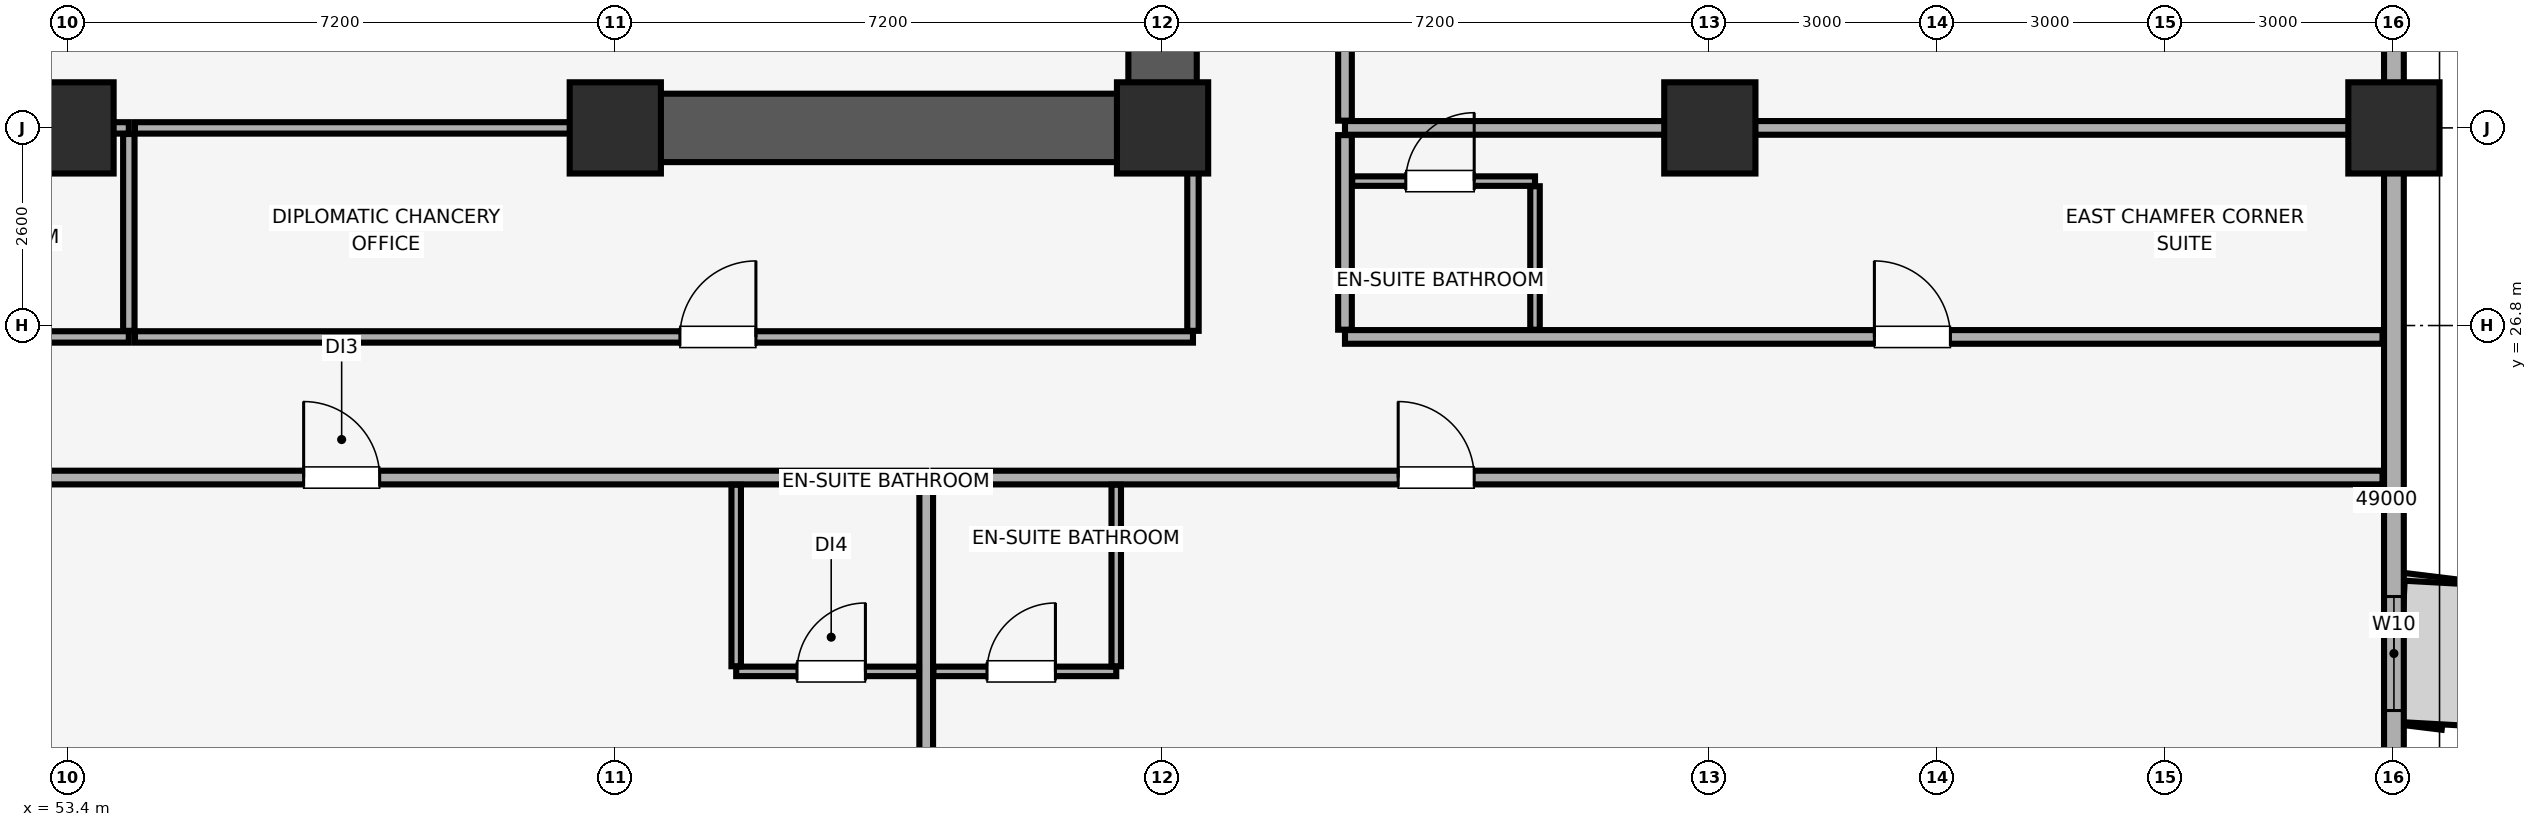
"""IFC4 building model, lengths in metres.
Left out: names, types, materials, properties, quantities, classifications, styles, units other than length and angle.
Written with IfcOpenShell. Run it as: python <this file> out.ifc"""

import sys

from ifc_helpers import new_model, si_unit, direction, frame, frame_2d, origin, origin_2d, place, context, subcontext, project, spatial, rectangle, extrude, element, fill, save


model = new_model("IFC4")
c1 = context("Model", 3, precision=1e-05, world=origin(), true_north=direction((0.0, 1.0)))
c2 = subcontext(c1, "Body", "Model", "MODEL_VIEW")
j1 = project(units=[si_unit("LENGTHUNIT", "METRE"), si_unit("PLANEANGLEUNIT", "RADIAN")], contexts=[c1])
p1 = place(None, origin())
s1 = spatial("IfcSite", under=j1, at=p1, CompositionType="ELEMENT")
p2 = place(p1, origin())
s2 = spatial("IfcBuilding", under=s1, at=p2, CompositionType="ELEMENT")
p3 = place(p2, frame((0.0, 0.0, 126.8)))
s3 = spatial("IfcBuildingStorey", under=s2, at=p3, CompositionType="ELEMENT", Elevation=126.8)
for number, where, z_axis, x_axis in (
    (1, (84.0, 29.4, 0.0), (0.0, 0.0, 1.0), (1.0, 0.0, 0.0)),
    (2, (53.4, 29.4, 0.0), (0.0, 0.0, 1.0), (1.0, 0.0, 0.0)),
    (3, (60.6, 29.4, 0.0), (0.0, 0.0, 1.0), (1.0, 0.0, 0.0)),
    (4, (67.8, 29.4, 0.0), (0.0, 0.0, 1.0), (1.0, 0.0, 0.0)),
    (5, (75.0, 29.4, 0.0), (0.0, 0.0, 1.0), (1.0, 0.0, 0.0)),
):
    element("IfcColumn", number, at=place(p3, frame(where, z_axis=z_axis, x_axis=x_axis)), inside=s3, PredefinedType="COLUMN", context=c2, shape_type="SweptSolid", body=[
        extrude(rectangle(XDim=1.2, YDim=1.2, at=origin_2d()), origin(), (0.0, 0.0, 1.0), 3.51),
    ])
p4 = place(p3, frame((84.0, 4.2, 0.0), z_axis=(0.0, 0.0, 1.0), x_axis=(0.0, 1.0, 0.0)))
e6 = element("IfcWall", 6, at=p4, inside=s3, PredefinedType="SOLIDWALL", context=c2, shape_type="SweptSolid", body=[
    extrude(rectangle(XDim=40.6, YDim=0.26, at=frame_2d((20.3, 0.0))), origin(), (0.0, 0.0, 1.0), 2.56),
])
p5 = place(p4, frame((6.05, 0.0, 0.85)))
e7 = element("IfcOpeningElement", 7, at=p5, cuts=e6, PredefinedType="OPENING", context=c2, shape_type="SweptSolid", body=[
    extrude(rectangle(XDim=1.5, YDim=1.4, at=frame_2d((0.75, 0.7))), frame((0.0, 0.14, 0.0), z_axis=(0.0, -1.0, 0.0), x_axis=(1.0, 0.0, 0.0)), (0.0, 0.0, 1.0), 0.28),
])
p6 = place(p4, frame((12.765, 0.0, 0.85)))
e8 = element("IfcOpeningElement", 8, at=p6, cuts=e6, PredefinedType="OPENING", context=c2, shape_type="SweptSolid", body=[
    extrude(rectangle(XDim=1.5, YDim=1.4, at=frame_2d((0.75, 0.7))), frame((0.0, 0.14, 0.0), z_axis=(0.0, -1.0, 0.0), x_axis=(1.0, 0.0, 0.0)), (0.0, 0.0, 1.0), 0.28),
])
p7 = place(p4, frame((17.535, 0.0, 0.85)))
e9 = element("IfcOpeningElement", 9, at=p7, cuts=e6, PredefinedType="OPENING", context=c2, shape_type="SweptSolid", body=[
    extrude(rectangle(XDim=1.5, YDim=1.4, at=frame_2d((0.75, 0.7))), frame((0.0, 0.14, 0.0), z_axis=(0.0, -1.0, 0.0), x_axis=(1.0, 0.0, 0.0)), (0.0, 0.0, 1.0), 0.28),
])
p8 = place(p4, frame((27.165, 0.0, 0.85)))
e10 = element("IfcOpeningElement", 10, at=p8, cuts=e6, PredefinedType="OPENING", context=c2, shape_type="SweptSolid", body=[
    extrude(rectangle(XDim=1.5, YDim=1.4, at=frame_2d((0.75, 0.7))), frame((0.0, 0.14, 0.0), z_axis=(0.0, -1.0, 0.0), x_axis=(1.0, 0.0, 0.0)), (0.0, 0.0, 1.0), 0.28),
])
p9 = place(p4, frame((31.935, 0.0, 0.85)))
e11 = element("IfcOpeningElement", 11, at=p9, cuts=e6, PredefinedType="OPENING", context=c2, shape_type="SweptSolid", body=[
    extrude(rectangle(XDim=1.5, YDim=1.4, at=frame_2d((0.75, 0.7))), frame((0.0, 0.14, 0.0), z_axis=(0.0, -1.0, 0.0), x_axis=(1.0, 0.0, 0.0)), (0.0, 0.0, 1.0), 0.28),
])
p10 = place(p4, frame((37.365, 0.0, 0.85)))
e12 = element("IfcOpeningElement", 12, at=p10, cuts=e6, PredefinedType="OPENING", context=c2, shape_type="SweptSolid", body=[
    extrude(rectangle(XDim=1.5, YDim=1.4, at=frame_2d((0.75, 0.7))), frame((0.0, 0.14, 0.0), z_axis=(0.0, -1.0, 0.0), x_axis=(1.0, 0.0, 0.0)), (0.0, 0.0, 1.0), 0.28),
])
p11 = place(p3, frame((67.8, 29.4, 0.0), z_axis=(0.0, 0.0, 1.0), x_axis=(0.0, 1.0, 0.0)))
e13 = element("IfcWall", 13, at=p11, inside=s3, PredefinedType="SHEAR", context=c2, shape_type="SweptSolid", body=[
    extrude(rectangle(XDim=19.2, YDim=0.9, at=frame_2d((9.6, 0.0))), origin(), (0.0, 0.0, 1.0), 3.51),
])
p12 = place(p3, frame((46.0, 29.4, 0.0), z_axis=(0.0, 0.0, 1.0), x_axis=(1.0, 0.0, 0.0)))
e14 = element("IfcWall", 14, at=p12, inside=s3, PredefinedType="SHEAR", context=c2, shape_type="SweptSolid", body=[
    extrude(rectangle(XDim=7.6, YDim=0.9, at=frame_2d((3.8, 0.0))), origin(), (0.0, 0.0, 1.0), 3.51),
])
p13 = place(p3, frame((60.4, 29.4, 0.0), z_axis=(0.0, 0.0, 1.0), x_axis=(1.0, 0.0, 0.0)))
e15 = element("IfcWall", 15, at=p13, inside=s3, PredefinedType="SHEAR", context=c2, shape_type="SweptSolid", body=[
    extrude(rectangle(XDim=6.945, YDim=0.9, at=frame_2d((3.473, 0.0))), origin(), (0.0, 0.0, 1.0), 3.51),
])
p14 = place(p3, frame((49.625, 24.8, 0.0), z_axis=(0.0, 0.0, 1.0), x_axis=(1.0, 0.0, 0.0)))
e16 = element("IfcWall", 16, at=p14, inside=s3, PredefinedType="PARTITIONING", context=c2, shape_type="SweptSolid", body=[
    extrude(rectangle(XDim=15.066, YDim=0.18, at=frame_2d((7.533, 0.0))), origin(), (0.0, 0.0, 1.0), 3.51),
])
p15 = place(p14, frame((6.875, 0.0, 0.0)))
e17 = element("IfcOpeningElement", 17, at=p15, cuts=e16, PredefinedType="OPENING", context=c2, shape_type="SweptSolid", body=[
    extrude(rectangle(XDim=1.0, YDim=2.15, at=frame_2d((0.5, 1.075))), frame((0.0, 0.1, 0.0), z_axis=(0.0, -1.0, 0.0), x_axis=(1.0, 0.0, 0.0)), (0.0, 0.0, 1.0), 0.2),
])
p16 = place(p3, frame((64.691, 0.15, 0.0), z_axis=(0.0, 0.0, 1.0), x_axis=(0.0, 1.0, 0.0)))
e18 = element("IfcWall", 18, at=p16, inside=s3, PredefinedType="PARTITIONING", context=c2, shape_type="SweptSolid", body=[
    extrude(rectangle(XDim=24.555, YDim=0.18, at=frame_2d((12.278, 0.0))), origin(), (0.0, 0.0, 1.0), 3.51),
])
p17 = place(p3, frame((62.191, 22.25, 0.0), z_axis=(0.0, 0.0, 1.0), x_axis=(1.0, 0.0, 0.0)))
e19 = element("IfcWall", 19, at=p17, inside=s3, PredefinedType="PARTITIONING", context=c2, shape_type="SweptSolid", body=[
    extrude(rectangle(XDim=2.405, YDim=0.125, at=frame_2d((1.203, 0.0))), origin(), (0.0, 0.0, 1.0), 3.51),
])
p18 = place(p17, frame((0.8, 0.0, 0.0)))
e20 = element("IfcOpeningElement", 20, at=p18, cuts=e19, PredefinedType="OPENING", context=c2, shape_type="SweptSolid", body=[
    extrude(rectangle(XDim=0.9, YDim=2.1, at=frame_2d((0.45, 1.05))), frame((0.0, 0.073, 0.0), z_axis=(0.0, -1.0, 0.0), x_axis=(1.0, 0.0, 0.0)), (0.0, 0.0, 1.0), 0.145),
])
p19 = place(p3, frame((62.191, 22.317, 0.0), z_axis=(0.0, 0.0, 1.0), x_axis=(0.0, 1.0, 0.0)))
e21 = element("IfcWall", 21, at=p19, inside=s3, PredefinedType="PARTITIONING", context=c2, shape_type="SweptSolid", body=[
    extrude(rectangle(XDim=2.388, YDim=0.125, at=frame_2d((1.194, 0.0))), origin(), (0.0, 0.0, 1.0), 3.51),
])
p20 = place(p3, frame((64.786, 24.8, 0.0), z_axis=(0.0, 0.0, 1.0), x_axis=(1.0, 0.0, 0.0)))
e22 = element("IfcWall", 22, at=p20, inside=s3, PredefinedType="PARTITIONING", context=c2, shape_type="SweptSolid", body=[
    extrude(rectangle(XDim=19.064, YDim=0.18, at=frame_2d((9.532, 0.0))), origin(), (0.0, 0.0, 1.0), 3.51),
])
p21 = place(p20, frame((6.115, 0.0, 0.0)))
e23 = element("IfcOpeningElement", 23, at=p21, cuts=e22, PredefinedType="OPENING", context=c2, shape_type="SweptSolid", body=[
    extrude(rectangle(XDim=1.0, YDim=2.15, at=frame_2d((0.5, 1.075))), frame((0.0, 0.1, 0.0), z_axis=(0.0, -1.0, 0.0), x_axis=(1.0, 0.0, 0.0)), (0.0, 0.0, 1.0), 0.2),
])
p22 = place(p3, frame((64.786, 22.25, 0.0), z_axis=(0.0, 0.0, 1.0), x_axis=(1.0, 0.0, 0.0)))
e24 = element("IfcWall", 24, at=p22, inside=s3, PredefinedType="PARTITIONING", context=c2, shape_type="SweptSolid", body=[
    extrude(rectangle(XDim=2.405, YDim=0.125, at=frame_2d((1.203, 0.0))), origin(), (0.0, 0.0, 1.0), 3.51),
])
p23 = place(p22, frame((0.705, 0.0, 0.0)))
e25 = element("IfcOpeningElement", 25, at=p23, cuts=e24, PredefinedType="OPENING", context=c2, shape_type="SweptSolid", body=[
    extrude(rectangle(XDim=0.9, YDim=2.1, at=frame_2d((0.45, 1.05))), frame((0.0, 0.073, 0.0), z_axis=(0.0, -1.0, 0.0), x_axis=(1.0, 0.0, 0.0)), (0.0, 0.0, 1.0), 0.145),
])
p24 = place(p3, frame((67.191, 22.317, 0.0), z_axis=(0.0, 0.0, 1.0), x_axis=(0.0, 1.0, 0.0)))
e26 = element("IfcWall", 26, at=p24, inside=s3, PredefinedType="PARTITIONING", context=c2, shape_type="SweptSolid", body=[
    extrude(rectangle(XDim=2.388, YDim=0.125, at=frame_2d((1.194, 0.0))), origin(), (0.0, 0.0, 1.0), 3.51),
])
p25 = place(p3, frame((44.2, 26.65, 0.0), z_axis=(0.0, 0.0, 1.0), x_axis=(1.0, 0.0, 0.0)))
e27 = element("IfcWall", 27, at=p25, inside=s3, PredefinedType="PARTITIONING", context=c2, shape_type="SweptSolid", body=[
    extrude(rectangle(XDim=10.0, YDim=0.15, at=frame_2d((5.0, 0.0))), origin(), (0.0, 0.0, 1.0), 3.51),
])
p26 = place(p25, frame((4.5, 0.0, 0.0)))
e28 = element("IfcOpeningElement", 28, at=p26, cuts=e27, PredefinedType="OPENING", context=c2, shape_type="SweptSolid", body=[
    extrude(rectangle(XDim=1.0, YDim=2.15, at=frame_2d((0.5, 1.075))), frame((0.0, 0.085, 0.0), z_axis=(0.0, -1.0, 0.0), x_axis=(1.0, 0.0, 0.0)), (0.0, 0.0, 1.0), 0.17),
])
p27 = place(p3, frame((53.61, 29.4, 0.0), z_axis=(0.0, 0.0, 1.0), x_axis=(1.0, 0.0, 0.0)))
e29 = element("IfcWall", 29, at=p27, inside=s3, PredefinedType="PARTITIONING", context=c2, shape_type="SweptSolid", body=[
    extrude(rectangle(XDim=0.59, YDim=0.15, at=frame_2d((0.295, 0.0))), origin(), (0.0, 0.0, 1.0), 2.41),
])
p28 = place(p3, frame((54.2, 26.73, 0.0), z_axis=(0.0, 0.0, 1.0), x_axis=(0.0, 1.0, 0.0)))
e30 = element("IfcWall", 30, at=p28, inside=s3, PredefinedType="PARTITIONING", context=c2, shape_type="SweptSolid", body=[
    extrude(rectangle(XDim=2.59, YDim=0.15, at=frame_2d((1.295, 0.0))), origin(), (0.0, 0.0, 1.0), 3.51),
])
p29 = place(p3, frame((54.28, 26.65, 0.0), z_axis=(0.0, 0.0, 1.0), x_axis=(1.0, 0.0, 0.0)))
e31 = element("IfcWall", 31, at=p29, inside=s3, PredefinedType="PARTITIONING", context=c2, shape_type="SweptSolid", body=[
    extrude(rectangle(XDim=13.92, YDim=0.15, at=frame_2d((6.96, 0.0))), origin(), (0.0, 0.0, 1.0), 3.51),
])
p30 = place(p29, frame((7.17, 0.0, 0.0)))
e32 = element("IfcOpeningElement", 32, at=p30, cuts=e31, PredefinedType="OPENING", context=c2, shape_type="SweptSolid", body=[
    extrude(rectangle(XDim=1.0, YDim=2.15, at=frame_2d((0.5, 1.075))), frame((0.0, 0.085, 0.0), z_axis=(0.0, -1.0, 0.0), x_axis=(1.0, 0.0, 0.0)), (0.0, 0.0, 1.0), 0.17),
])
p31 = place(p3, frame((54.28, 29.4, 0.0), z_axis=(0.0, 0.0, 1.0), x_axis=(1.0, 0.0, 0.0)))
e33 = element("IfcWall", 33, at=p31, inside=s3, PredefinedType="PARTITIONING", context=c2, shape_type="SweptSolid", body=[
    extrude(rectangle(XDim=6.11, YDim=0.15, at=frame_2d((3.055, 0.0))), origin(), (0.0, 0.0, 1.0), 2.41),
])
p32 = place(p3, frame((68.2, 26.73, 0.0), z_axis=(0.0, 0.0, 1.0), x_axis=(0.0, 1.0, 0.0)))
e34 = element("IfcWall", 34, at=p32, inside=s3, PredefinedType="PARTITIONING", context=c2, shape_type="SweptSolid", body=[
    extrude(rectangle(XDim=2.66, YDim=0.15, at=frame_2d((1.33, 0.0))), origin(), (0.0, 0.0, 1.0), 3.51),
])
p33 = place(p3, frame((70.2, 26.65, 0.0), z_axis=(0.0, 0.0, 1.0), x_axis=(1.0, 0.0, 0.0)))
e35 = element("IfcWall", 35, at=p33, inside=s3, PredefinedType="PARTITIONING", context=c2, shape_type="SweptSolid", body=[
    extrude(rectangle(XDim=13.65, YDim=0.18, at=frame_2d((6.825, 0.0))), origin(), (0.0, 0.0, 1.0), 3.51),
])
p34 = place(p33, frame((6.965, 0.0, 0.0)))
e36 = element("IfcOpeningElement", 36, at=p34, cuts=e35, PredefinedType="OPENING", context=c2, shape_type="SweptSolid", body=[
    extrude(rectangle(XDim=1.0, YDim=2.15, at=frame_2d((0.5, 1.075))), frame((0.0, 0.1, 0.0), z_axis=(0.0, -1.0, 0.0), x_axis=(1.0, 0.0, 0.0)), (0.0, 0.0, 1.0), 0.2),
])
p35 = place(p3, frame((70.2, 29.4, 0.0), z_axis=(0.0, 0.0, 1.0), x_axis=(1.0, 0.0, 0.0)))
e37 = element("IfcWall", 37, at=p35, inside=s3, PredefinedType="PARTITIONING", context=c2, shape_type="SweptSolid", body=[
    extrude(rectangle(XDim=13.65, YDim=0.18, at=frame_2d((6.825, 0.0))), origin(), (0.0, 0.0, 1.0), 2.669),
])
p36 = place(p3, frame((70.2, 26.745, 0.0), z_axis=(0.0, 0.0, 1.0), x_axis=(0.0, 1.0, 0.0)))
e38 = element("IfcWall", 38, at=p36, inside=s3, PredefinedType="PARTITIONING", context=c2, shape_type="SweptSolid", body=[
    extrude(rectangle(XDim=2.56, YDim=0.18, at=frame_2d((1.28, 0.0))), origin(), (0.0, 0.0, 1.0), 3.51),
])
p37 = place(p3, frame((70.295, 28.7, 0.0), z_axis=(0.0, 0.0, 1.0), x_axis=(1.0, 0.0, 0.0)))
e39 = element("IfcWall", 39, at=p37, inside=s3, PredefinedType="PARTITIONING", context=c2, shape_type="SweptSolid", body=[
    extrude(rectangle(XDim=2.405, YDim=0.125, at=frame_2d((1.203, 0.0))), origin(), (0.0, 0.0, 1.0), 3.51),
])
p38 = place(p37, frame((0.705, 0.0, 0.0)))
e40 = element("IfcOpeningElement", 40, at=p38, cuts=e39, PredefinedType="OPENING", context=c2, shape_type="SweptSolid", body=[
    extrude(rectangle(XDim=0.9, YDim=2.1, at=frame_2d((0.45, 1.05))), frame((0.0, 0.073, 0.0), z_axis=(0.0, -1.0, 0.0), x_axis=(1.0, 0.0, 0.0)), (0.0, 0.0, 1.0), 0.145),
])
p39 = place(p3, frame((72.7, 26.745, 0.0), z_axis=(0.0, 0.0, 1.0), x_axis=(0.0, 1.0, 0.0)))
e41 = element("IfcWall", 41, at=p39, inside=s3, PredefinedType="PARTITIONING", context=c2, shape_type="SweptSolid", body=[
    extrude(rectangle(XDim=1.887, YDim=0.125, at=frame_2d((0.944, 0.0))), origin(), (0.0, 0.0, 1.0), 3.51),
])
p40 = place(p3, frame((70.2, 29.495, 0.0), z_axis=(0.0, 0.0, 1.0), x_axis=(0.0, 1.0, 0.0)))
e42 = element("IfcWall", 42, at=p40, inside=s3, PredefinedType="PARTITIONING", context=c2, shape_type="SweptSolid", body=[
    extrude(rectangle(XDim=19.355, YDim=0.18, at=frame_2d((9.677, 0.0))), origin(), (0.0, 0.0, 1.0), 3.51),
])
p41 = place(p40, frame((4.505, 0.0, 0.0)))
e43 = element("IfcOpeningElement", 43, at=p41, cuts=e42, PredefinedType="OPENING", context=c2, shape_type="SweptSolid", body=[
    extrude(rectangle(XDim=1.0, YDim=2.15, at=frame_2d((0.5, 1.075))), frame((0.0, 0.1, 0.0), z_axis=(0.0, -1.0, 0.0), x_axis=(1.0, 0.0, 0.0)), (0.0, 0.0, 1.0), 0.2),
])
p42 = place(p7, origin())
e44 = element("IfcWindow", 44, at=p42, inside=s3, PartitioningType="SINGLE_PANEL", PredefinedType="WINDOW", context=c2, shape_type="SweptSolid", body=[
    extrude(rectangle(XDim=1.5, YDim=1.4, at=frame_2d((0.75, 0.7))), frame((0.0, 0.03, 0.0), z_axis=(0.0, -1.0, 0.0), x_axis=(1.0, 0.0, 0.0)), (0.0, 0.0, 1.0), 0.06),
])
fill(e9, e44)
p43 = place(p15, origin())
e45 = element("IfcDoor", 45, at=p43, inside=s3, OperationType="SINGLE_SWING_LEFT", PredefinedType="DOOR", context=c2, shape_type="SweptSolid", body=[
    extrude(rectangle(XDim=1.0, YDim=2.15, at=frame_2d((0.5, 1.075))), frame((0.0, 0.025, 0.0), z_axis=(0.0, -1.0, 0.0), x_axis=(1.0, 0.0, 0.0)), (0.0, 0.0, 1.0), 0.05),
])
fill(e17, e45)
p44 = place(p18, origin())
e46 = element("IfcDoor", 46, at=p44, inside=s3, OperationType="SINGLE_SWING_RIGHT", PredefinedType="DOOR", context=c2, shape_type="SweptSolid", body=[
    extrude(rectangle(XDim=0.9, YDim=2.1, at=frame_2d((0.45, 1.05))), frame((0.0, 0.025, 0.0), z_axis=(0.0, -1.0, 0.0), x_axis=(1.0, 0.0, 0.0)), (0.0, 0.0, 1.0), 0.05),
])
fill(e20, e46)
p45 = place(p21, origin())
e47 = element("IfcDoor", 47, at=p45, inside=s3, OperationType="SINGLE_SWING_LEFT", PredefinedType="DOOR", context=c2, shape_type="SweptSolid", body=[
    extrude(rectangle(XDim=1.0, YDim=2.15, at=frame_2d((0.5, 1.075))), frame((0.0, 0.025, 0.0), z_axis=(0.0, -1.0, 0.0), x_axis=(1.0, 0.0, 0.0)), (0.0, 0.0, 1.0), 0.05),
])
fill(e23, e47)
p46 = place(p23, origin())
e48 = element("IfcDoor", 48, at=p46, inside=s3, OperationType="SINGLE_SWING_RIGHT", PredefinedType="DOOR", context=c2, shape_type="SweptSolid", body=[
    extrude(rectangle(XDim=0.9, YDim=2.1, at=frame_2d((0.45, 1.05))), frame((0.0, 0.025, 0.0), z_axis=(0.0, -1.0, 0.0), x_axis=(1.0, 0.0, 0.0)), (0.0, 0.0, 1.0), 0.05),
])
fill(e25, e48)
p47 = place(p30, origin())
e49 = element("IfcDoor", 49, at=p47, inside=s3, OperationType="SINGLE_SWING_RIGHT", PredefinedType="DOOR", context=c2, shape_type="SweptSolid", body=[
    extrude(rectangle(XDim=1.0, YDim=2.15, at=frame_2d((0.5, 1.075))), frame((0.0, 0.025, 0.0), z_axis=(0.0, -1.0, 0.0), x_axis=(1.0, 0.0, 0.0)), (0.0, 0.0, 1.0), 0.05),
])
fill(e32, e49)
p48 = place(p34, origin())
e50 = element("IfcDoor", 50, at=p48, inside=s3, OperationType="SINGLE_SWING_LEFT", PredefinedType="DOOR", context=c2, shape_type="SweptSolid", body=[
    extrude(rectangle(XDim=1.0, YDim=2.15, at=frame_2d((0.5, 1.075))), frame((0.0, 0.025, 0.0), z_axis=(0.0, -1.0, 0.0), x_axis=(1.0, 0.0, 0.0)), (0.0, 0.0, 1.0), 0.05),
])
fill(e36, e50)
p49 = place(p38, origin())
e51 = element("IfcDoor", 51, at=p49, inside=s3, OperationType="SINGLE_SWING_RIGHT", PredefinedType="DOOR", context=c2, shape_type="SweptSolid", body=[
    extrude(rectangle(XDim=0.9, YDim=2.1, at=frame_2d((0.45, 1.05))), frame((0.0, 0.025, 0.0), z_axis=(0.0, -1.0, 0.0), x_axis=(1.0, 0.0, 0.0)), (0.0, 0.0, 1.0), 0.05),
])
fill(e40, e51)
save(model, sys.argv[1])
